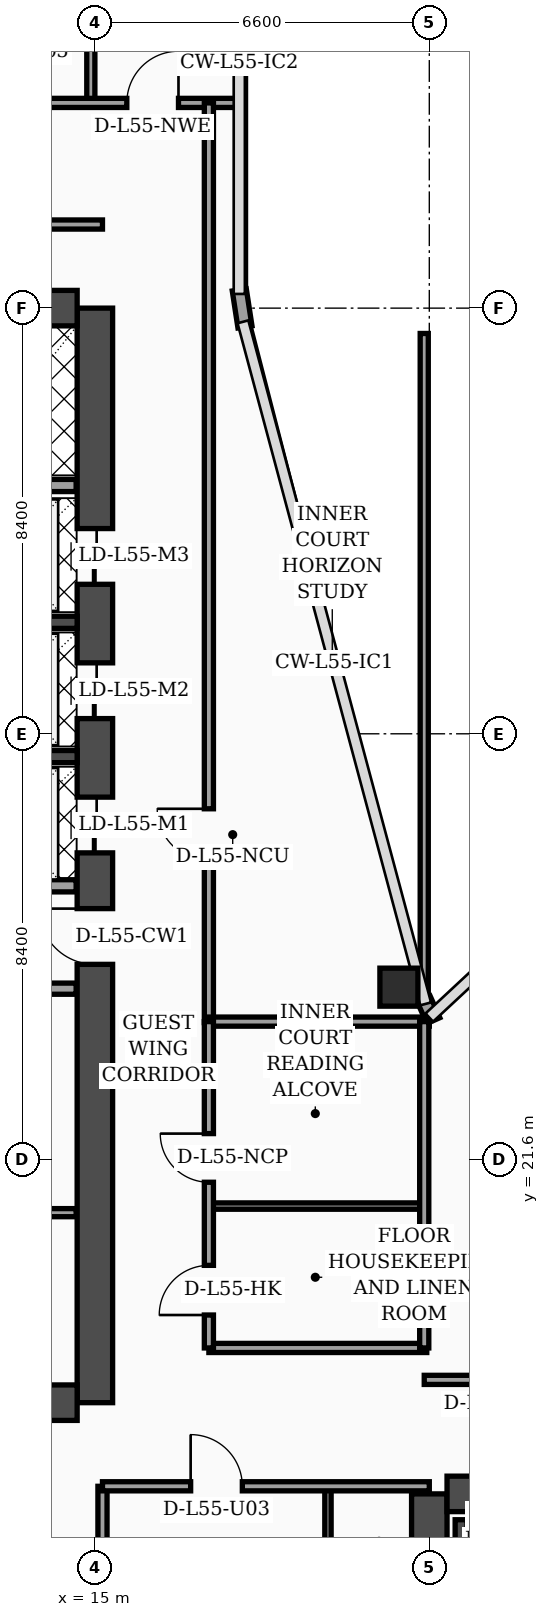
"""IFC4 building model, lengths in metres.
Left out: names, types, materials, properties, quantities, classifications, styles, units other than length and angle.
Written with IfcOpenShell. Run it as: python <this file> out.ifc"""

import sys

from ifc_helpers import new_model, si_unit, direction, frame, frame_2d, origin, origin_2d, place, context, subcontext, project, spatial, rectangle, hollow_rectangle, extrude, element, fill, save


model = new_model("IFC4")
c1 = context("Model", 3, precision=1e-05, world=origin(), true_north=direction((0.0, 1.0)))
c2 = subcontext(c1, "Body", "Model", "MODEL_VIEW")
j1 = project(units=[si_unit("LENGTHUNIT", "METRE"), si_unit("PLANEANGLEUNIT", "RADIAN")], contexts=[c1])
p1 = place(None, origin())
s1 = spatial("IfcSite", under=j1, at=p1, CompositionType="ELEMENT")
p2 = place(p1, origin())
s2 = spatial("IfcBuilding", under=s1, at=p2, CompositionType="ELEMENT")
p3 = place(p2, frame((0.0, 0.0, 223.1)))
s3 = spatial("IfcBuildingStorey", under=s2, at=p3, CompositionType="ELEMENT", Elevation=223.1)
p4 = place(p3, frame((15.0, 16.8, 0.0), z_axis=(0.0, 0.0, 1.0), x_axis=(0.0, 1.0, 0.0)))
e1 = element("IfcWall", 1, at=p4, inside=s3, PredefinedType="SHEAR", context=c2, shape_type="SweptSolid", body=[
    extrude(rectangle(XDim=21.6, YDim=0.7, at=frame_2d((10.8, 0.0))), origin(), (0.0, 0.0, 1.0), 3.56),
])
p5 = place(p4, frame((8.65, 0.0, 0.0)))
e2 = element("IfcOpeningElement", 2, at=p5, cuts=e1, PredefinedType="OPENING", context=c2, shape_type="SweptSolid", body=[
    extrude(rectangle(XDim=1.1, YDim=2.2, at=frame_2d((0.55, 1.1))), frame((0.0, 0.36, 0.0), z_axis=(0.0, -1.0, 0.0), x_axis=(1.0, 0.0, 0.0)), (0.0, 0.0, 1.0), 0.72),
])
p6 = place(p4, frame((10.85, 0.0, 0.0)))
e3 = element("IfcOpeningElement", 3, at=p6, cuts=e1, PredefinedType="OPENING", context=c2, shape_type="SweptSolid", body=[
    extrude(rectangle(XDim=1.1, YDim=2.2, at=frame_2d((0.55, 1.1))), frame((0.0, 0.36, 0.0), z_axis=(0.0, -1.0, 0.0), x_axis=(1.0, 0.0, 0.0)), (0.0, 0.0, 1.0), 0.72),
])
p7 = place(p4, frame((13.5, 0.0, 0.0)))
e4 = element("IfcOpeningElement", 4, at=p7, cuts=e1, PredefinedType="OPENING", context=c2, shape_type="SweptSolid", body=[
    extrude(rectangle(XDim=1.1, YDim=2.2, at=frame_2d((0.55, 1.1))), frame((0.0, 0.36, 0.0), z_axis=(0.0, -1.0, 0.0), x_axis=(1.0, 0.0, 0.0)), (0.0, 0.0, 1.0), 0.72),
])
p8 = place(p4, frame((16.15, 0.0, 0.0)))
e5 = element("IfcOpeningElement", 5, at=p8, cuts=e1, PredefinedType="OPENING", context=c2, shape_type="SweptSolid", body=[
    extrude(rectangle(XDim=1.1, YDim=2.2, at=frame_2d((0.55, 1.1))), frame((0.0, 0.36, 0.0), z_axis=(0.0, -1.0, 0.0), x_axis=(1.0, 0.0, 0.0)), (0.0, 0.0, 1.0), 0.72),
])
for number, where, z_axis, x_axis in (
    (6, (4.55, 38.4, 0.0), (0.0, 0.0, 1.0), (1.0, 0.0, 0.0)),
    (7, (4.55, 16.8, 0.0), (0.0, 0.0, 1.0), (1.0, 0.0, 0.0)),
):
    element("IfcWall", number, at=place(p3, frame(where, z_axis=z_axis, x_axis=x_axis)), inside=s3, PredefinedType="SHEAR", context=c2, shape_type="SweptSolid", body=[
        extrude(rectangle(XDim=10.1, YDim=0.7, at=frame_2d((5.05, 0.0))), origin(), (0.0, 0.0, 1.0), 3.56),
    ])
p9 = place(p3, frame((21.6, 4.6, 0.0), z_axis=(0.0, 0.0, 1.0), x_axis=(0.0, 1.0, 0.0)))
e8 = element("IfcWall", 8, at=p9, inside=s3, PredefinedType="SHEAR", context=c2, shape_type="SweptSolid", body=[
    extrude(rectangle(XDim=10.4, YDim=0.7, at=frame_2d((5.2, 0.0))), origin(), (0.0, 0.0, 1.0), 3.56),
])
p10 = place(p3, frame((21.95, 15.0, 0.0), z_axis=(0.0, 0.0, 1.0), x_axis=(1.0, 0.0, 0.0)))
e9 = element("IfcWall", 9, at=p10, inside=s3, PredefinedType="SHEAR", context=c2, shape_type="SweptSolid", body=[
    extrude(rectangle(XDim=10.1, YDim=0.7, at=frame_2d((5.05, 0.0))), origin(), (0.0, 0.0, 1.0), 3.56),
])
p11 = place(p10, frame((4.95, 0.0, 0.0)))
e10 = element("IfcOpeningElement", 10, at=p11, cuts=e9, PredefinedType="OPENING", context=c2, shape_type="SweptSolid", body=[
    extrude(rectangle(XDim=1.1, YDim=2.2, at=frame_2d((0.55, 1.1))), frame((0.0, 0.36, 0.0), z_axis=(0.0, -1.0, 0.0), x_axis=(1.0, 0.0, 0.0)), (0.0, 0.0, 1.0), 0.72),
])
p12 = place(p3, frame((22.23, 4.95, 0.0), z_axis=(0.0, 0.0, 1.0), x_axis=(0.0, 1.0, 0.0)))
e11 = element("IfcWall", 11, at=p12, inside=s3, PredefinedType="SOLIDWALL", context=c2, shape_type="SweptSolid", body=[
    extrude(rectangle(XDim=9.54, YDim=0.24, at=frame_2d((4.77, 0.0))), origin(), (0.0, 0.0, 1.0), 3.56),
])
p13 = place(p3, frame((22.35, 14.37, 0.0), z_axis=(0.0, 0.0, 1.0), x_axis=(1.0, 0.0, 0.0)))
e12 = element("IfcWall", 12, at=p13, inside=s3, PredefinedType="SOLIDWALL", context=c2, shape_type="SweptSolid", body=[
    extrude(rectangle(XDim=3.1, YDim=0.24, at=frame_2d((1.55, 0.0))), origin(), (0.0, 0.0, 1.0), 3.56),
])
for number, where, z_axis, x_axis in (
    (13, (12.18, 29.55, 0.0), (0.0, 0.0, 1.0), (1.0, 0.0, 0.0)),
    (14, (12.18, 32.2, 0.0), (0.0, 0.0, 1.0), (1.0, 0.0, 0.0)),
):
    element("IfcWall", number, at=place(p3, frame(where, z_axis=z_axis, x_axis=x_axis)), inside=s3, PredefinedType="SOLIDWALL", context=c2, shape_type="SweptSolid", body=[
        extrude(rectangle(XDim=2.47, YDim=0.24, at=frame_2d((1.235, 0.0))), origin(), (0.0, 0.0, 1.0), 3.56),
    ])
p14 = place(p3, frame((21.0, 25.0, 0.0), z_axis=(0.0, 0.0, 1.0), x_axis=(1.0, 0.0, 0.0)))
e15 = element("IfcColumn", 15, at=p14, inside=s3, PredefinedType="COLUMN", context=c2, shape_type="SweptSolid", body=[
    extrude(hollow_rectangle(XDim=0.75, YDim=0.75, WallThickness=0.032, at=origin_2d()), origin(), (0.0, 0.0, 1.0), 3.56),
])
p15 = place(p3, frame((21.68, 24.34, 0.0), z_axis=(0.0, 0.0, 1.0), x_axis=(-0.40758134973, 0.913168901875, 0.0)))
e16 = element("IfcWall", 16, at=p15, inside=s3, PredefinedType="SOLIDWALL", context=c2, shape_type="SweptSolid", body=[
    extrude(rectangle(XDim=0.471, YDim=0.28, at=frame_2d((0.235, 0.0))), origin(), (0.0, 0.0, 1.0), 3.56),
])
p16 = place(p3, frame((17.962, 38.03, 0.0), z_axis=(0.0, 0.0, 1.0), x_axis=(-0.15141125477, 0.988470855377, 0.0)))
e17 = element("IfcWall", 17, at=p16, inside=s3, PredefinedType="SOLIDWALL", context=c2, shape_type="SweptSolid", body=[
    extrude(rectangle(XDim=0.739, YDim=0.28, at=frame_2d((0.369, 0.0))), origin(), (0.0, 0.0, 1.0), 3.56),
])
p17 = place(p3, frame((9.68, 20.55, 0.0), z_axis=(0.0, 0.0, 1.0), x_axis=(1.0, 0.0, 0.0)))
e18 = element("IfcWall", 18, at=p17, inside=s3, PredefinedType="PARTITIONING", context=c2, shape_type="SweptSolid", body=[
    extrude(rectangle(XDim=4.95, YDim=0.16, at=frame_2d((2.475, 0.0))), origin(), (0.0, 0.0, 1.0), 3.56),
])
p18 = place(p17, frame((1.1, 0.0, 0.0)))
e19 = element("IfcOpeningElement", 19, at=p18, cuts=e18, PredefinedType="OPENING", context=c2, shape_type="SweptSolid", body=[
    extrude(rectangle(XDim=0.98, YDim=2.15, at=frame_2d((0.49, 1.075))), frame((0.0, 0.09, 0.0), z_axis=(0.0, -1.0, 0.0), x_axis=(1.0, 0.0, 0.0)), (0.0, 0.0, 1.0), 0.18),
])
p19 = place(p3, frame((9.68, 24.97, 0.0), z_axis=(0.0, 0.0, 1.0), x_axis=(1.0, 0.0, 0.0)))
e20 = element("IfcWall", 20, at=p19, inside=s3, PredefinedType="SOLIDWALL", context=c2, shape_type="SweptSolid", body=[
    extrude(rectangle(XDim=4.95, YDim=0.22, at=frame_2d((2.475, 0.0))), origin(), (0.0, 0.0, 1.0), 2.94),
])
p20 = place(p19, frame((0.9, 0.0, 0.0)))
e21 = element("IfcOpeningElement", 21, at=p20, cuts=e20, PredefinedType="OPENING", context=c2, shape_type="SweptSolid", body=[
    extrude(rectangle(XDim=0.98, YDim=2.15, at=frame_2d((0.49, 1.075))), frame((0.0, 0.12, 0.0), z_axis=(0.0, -1.0, 0.0), x_axis=(1.0, 0.0, 0.0)), (0.0, 0.0, 1.0), 0.24),
])
p21 = place(p3, frame((12.25, 27.0, 0.0), z_axis=(0.0, 0.0, 1.0), x_axis=(1.0, 0.0, 0.0)))
e22 = element("IfcWall", 22, at=p21, inside=s3, PredefinedType="SOLIDWALL", context=c2, shape_type="SweptSolid", body=[
    extrude(rectangle(XDim=2.38, YDim=0.24, at=frame_2d((1.19, 0.0))), origin(), (0.0, 0.0, 1.0), 3.56),
])
p22 = place(p3, frame((9.66, 34.9, 0.0), z_axis=(0.0, 0.0, 1.0), x_axis=(1.0, 0.0, 0.0)))
e23 = element("IfcWall", 23, at=p22, inside=s3, PredefinedType="SOLIDWALL", context=c2, shape_type="SweptSolid", body=[
    extrude(rectangle(XDim=4.97, YDim=0.24, at=frame_2d((2.485, 0.0))), origin(), (0.0, 0.0, 1.0), 3.56),
])
p23 = place(p3, frame((15.15, 2.44, 0.0), z_axis=(0.0, 0.0, 1.0), x_axis=(0.0, 1.0, 0.0)))
e24 = element("IfcWall", 24, at=p23, inside=s3, PredefinedType="PARTITIONING", context=c2, shape_type="SweptSolid", body=[
    extrude(rectangle(XDim=12.71, YDim=0.18, at=frame_2d((6.355, 0.0))), origin(), (0.0, 0.0, 1.0), 3.09),
])
p24 = place(p3, frame((19.6, 2.44, 0.0), z_axis=(0.0, 0.0, 1.0), x_axis=(0.0, 1.0, 0.0)))
e25 = element("IfcWall", 25, at=p24, inside=s3, PredefinedType="PARTITIONING", context=c2, shape_type="SweptSolid", body=[
    extrude(rectangle(XDim=12.71, YDim=0.125, at=frame_2d((6.355, 0.0))), origin(), (0.0, 0.0, 1.0), 2.59),
])
p25 = place(p24, frame((4.34, 0.0, 0.0)))
e26 = element("IfcOpeningElement", 26, at=p25, cuts=e25, PredefinedType="OPENING", context=c2, shape_type="SweptSolid", body=[
    extrude(rectangle(XDim=0.96, YDim=2.2, at=frame_2d((0.48, 1.1))), frame((0.0, 0.073, 0.0), z_axis=(0.0, -1.0, 0.0), x_axis=(1.0, 0.0, 0.0)), (0.0, 0.0, 1.0), 0.145),
])
p26 = place(p24, frame((10.18, 0.0, 0.0)))
e27 = element("IfcOpeningElement", 27, at=p26, cuts=e25, PredefinedType="OPENING", context=c2, shape_type="SweptSolid", body=[
    extrude(rectangle(XDim=0.9, YDim=2.15, at=frame_2d((0.45, 1.075))), frame((0.0, 0.073, 0.0), z_axis=(0.0, -1.0, 0.0), x_axis=(1.0, 0.0, 0.0)), (0.0, 0.0, 1.0), 0.145),
])
p27 = place(p3, frame((15.15, 15.15, 0.0), z_axis=(0.0, 0.0, 1.0), x_axis=(1.0, 0.0, 0.0)))
e28 = element("IfcWall", 28, at=p27, inside=s3, PredefinedType="PARTITIONING", context=c2, shape_type="SweptSolid", body=[
    extrude(rectangle(XDim=6.45, YDim=0.18, at=frame_2d((3.225, 0.0))), origin(), (0.0, 0.0, 1.0), 2.59),
])
p28 = place(p27, frame((1.74, 0.0, 0.0)))
e29 = element("IfcOpeningElement", 29, at=p28, cuts=e28, PredefinedType="OPENING", context=c2, shape_type="SweptSolid", body=[
    extrude(rectangle(XDim=1.02, YDim=2.2, at=frame_2d((0.51, 1.1))), frame((0.0, 0.1, 0.0), z_axis=(0.0, -1.0, 0.0), x_axis=(1.0, 0.0, 0.0)), (0.0, 0.0, 1.0), 0.2),
])
p29 = place(p3, frame((14.92, 42.45, 0.0), z_axis=(0.0, 0.0, 1.0), x_axis=(0.0, 1.0, 0.0)))
e30 = element("IfcWall", 30, at=p29, inside=s3, PredefinedType="PARTITIONING", context=c2, shape_type="SweptSolid", body=[
    extrude(rectangle(XDim=5.35, YDim=0.16, at=frame_2d((2.675, 0.0))), origin(), (0.0, 0.0, 1.0), 3.09),
])
p30 = place(p3, frame((0.08, 42.45, 0.0), z_axis=(0.0, 0.0, 1.0), x_axis=(1.0, 0.0, 0.0)))
e31 = element("IfcWall", 31, at=p30, inside=s3, PredefinedType="PARTITIONING", context=c2, shape_type="SweptSolid", body=[
    extrude(rectangle(XDim=17.77, YDim=0.18, at=frame_2d((8.885, 0.0))), origin(), (0.0, 0.0, 1.0), 2.94),
])
p31 = place(p30, frame((0.9, 0.0, 0.0)))
e32 = element("IfcOpeningElement", 32, at=p31, cuts=e31, PredefinedType="OPENING", context=c2, shape_type="SweptSolid", body=[
    extrude(rectangle(XDim=1.02, YDim=2.2, at=frame_2d((0.51, 1.1))), frame((0.0, 0.1, 0.0), z_axis=(0.0, -1.0, 0.0), x_axis=(1.0, 0.0, 0.0)), (0.0, 0.0, 1.0), 0.2),
])
p32 = place(p30, frame((4.75, 0.0, 0.0)))
e33 = element("IfcOpeningElement", 33, at=p32, cuts=e31, PredefinedType="OPENING", context=c2, shape_type="SweptSolid", body=[
    extrude(rectangle(XDim=1.02, YDim=2.2, at=frame_2d((0.51, 1.1))), frame((0.0, 0.1, 0.0), z_axis=(0.0, -1.0, 0.0), x_axis=(1.0, 0.0, 0.0)), (0.0, 0.0, 1.0), 0.2),
])
p33 = place(p30, frame((10.63, 0.0, 0.0)))
e34 = element("IfcOpeningElement", 34, at=p33, cuts=e31, PredefinedType="OPENING", context=c2, shape_type="SweptSolid", body=[
    extrude(rectangle(XDim=1.02, YDim=2.2, at=frame_2d((0.51, 1.1))), frame((0.0, 0.1, 0.0), z_axis=(0.0, -1.0, 0.0), x_axis=(1.0, 0.0, 0.0)), (0.0, 0.0, 1.0), 0.2),
])
p34 = place(p30, frame((15.55, 0.0, 0.0)))
e35 = element("IfcOpeningElement", 35, at=p34, cuts=e31, PredefinedType="OPENING", context=c2, shape_type="SweptSolid", body=[
    extrude(rectangle(XDim=1.02, YDim=2.2, at=frame_2d((0.51, 1.1))), frame((0.0, 0.1, 0.0), z_axis=(0.0, -1.0, 0.0), x_axis=(1.0, 0.0, 0.0)), (0.0, 0.0, 1.0), 0.2),
])
p35 = place(p3, frame((17.25, 24.3, 0.0), z_axis=(0.0, 0.0, 1.0), x_axis=(0.0, 1.0, 0.0)))
e36 = element("IfcWall", 36, at=p35, inside=s3, PredefinedType="PARTITIONING", context=c2, shape_type="SweptSolid", body=[
    extrude(rectangle(XDim=18.15, YDim=0.18, at=frame_2d((9.075, 0.0))), origin(), (0.0, 0.0, 1.0), 2.94),
])
p36 = place(p35, frame((3.2, 0.0, 0.0)))
e37 = element("IfcOpeningElement", 37, at=p36, cuts=e36, PredefinedType="OPENING", context=c2, shape_type="SweptSolid", body=[
    extrude(rectangle(XDim=1.02, YDim=2.2, at=frame_2d((0.51, 1.1))), frame((0.0, 0.1, 0.0), z_axis=(0.0, -1.0, 0.0), x_axis=(1.0, 0.0, 0.0)), (0.0, 0.0, 1.0), 0.2),
])
p37 = place(p3, frame((3.83, 40.05, 0.0), z_axis=(0.0, 0.0, 1.0), x_axis=(1.0, 0.0, 0.0)))
e38 = element("IfcWall", 38, at=p37, inside=s3, PredefinedType="PARTITIONING", context=c2, shape_type="SweptSolid", body=[
    extrude(rectangle(XDim=11.32, YDim=0.18, at=frame_2d((5.66, 0.0))), origin(), (0.0, 0.0, 1.0), 2.94),
])
p38 = place(p3, frame((17.25, 17.88, 0.0), z_axis=(0.0, 0.0, 1.0), x_axis=(1.0, 0.0, 0.0)))
e39 = element("IfcWall", 39, at=p38, inside=s3, PredefinedType="PARTITIONING", context=c2, shape_type="SweptSolid", body=[
    extrude(rectangle(XDim=4.3, YDim=0.18, at=frame_2d((2.15, 0.0))), origin(), (0.0, 0.0, 1.0), 3.09),
])
p39 = place(p3, frame((17.25, 20.68, 0.0), z_axis=(0.0, 0.0, 1.0), x_axis=(1.0, 0.0, 0.0)))
e40 = element("IfcWall", 40, at=p39, inside=s3, PredefinedType="PARTITIONING", context=c2, shape_type="SweptSolid", body=[
    extrude(rectangle(XDim=4.3, YDim=0.125, at=frame_2d((2.15, 0.0))), origin(), (0.0, 0.0, 1.0), 3.56),
])
p40 = place(p3, frame((17.25, 24.32, 0.0), z_axis=(0.0, 0.0, 1.0), x_axis=(1.0, 0.0, 0.0)))
e41 = element("IfcWall", 41, at=p40, inside=s3, PredefinedType="PARTITIONING", context=c2, shape_type="SweptSolid", body=[
    extrude(rectangle(XDim=4.35, YDim=0.18, at=frame_2d((2.175, 0.0))), origin(), (0.0, 0.0, 1.0), 3.56),
])
p41 = place(p3, frame((21.5, 17.88, 0.0), z_axis=(0.0, 0.0, 1.0), x_axis=(0.0, 1.0, 0.0)))
e42 = element("IfcWall", 42, at=p41, inside=s3, PredefinedType="PARTITIONING", context=c2, shape_type="SweptSolid", body=[
    extrude(rectangle(XDim=6.44, YDim=0.18, at=frame_2d((3.22, 0.0))), origin(), (0.0, 0.0, 1.0), 3.09),
])
p42 = place(p3, frame((17.25, 17.88, 0.0), z_axis=(0.0, 0.0, 1.0), x_axis=(0.0, 1.0, 0.0)))
e43 = element("IfcWall", 43, at=p42, inside=s3, PredefinedType="PARTITIONING", context=c2, shape_type="SweptSolid", body=[
    extrude(rectangle(XDim=6.44, YDim=0.18, at=frame_2d((3.22, 0.0))), origin(), (0.0, 0.0, 1.0), 3.09),
])
p43 = place(p42, frame((0.65, 0.0, 0.0)))
e44 = element("IfcOpeningElement", 44, at=p43, cuts=e43, PredefinedType="OPENING", context=c2, shape_type="SweptSolid", body=[
    extrude(rectangle(XDim=0.98, YDim=2.15, at=frame_2d((0.49, 1.075))), frame((0.0, 0.1, 0.0), z_axis=(0.0, -1.0, 0.0), x_axis=(1.0, 0.0, 0.0)), (0.0, 0.0, 1.0), 0.2),
])
p44 = place(p42, frame((3.27, 0.0, 0.0)))
e45 = element("IfcOpeningElement", 45, at=p44, cuts=e43, PredefinedType="OPENING", context=c2, shape_type="SweptSolid", body=[
    extrude(rectangle(XDim=0.96, YDim=2.2, at=frame_2d((0.48, 1.1))), frame((0.0, 0.1, 0.0), z_axis=(0.0, -1.0, 0.0), x_axis=(1.0, 0.0, 0.0)), (0.0, 0.0, 1.0), 0.2),
])
p45 = place(p3, frame((21.5, 24.85, 0.0), z_axis=(0.0, 0.0, 1.0), x_axis=(0.0, 1.0, 0.0)))
e46 = element("IfcWall", 46, at=p45, inside=s3, PredefinedType="PARTITIONING", context=c2, shape_type="SweptSolid", body=[
    extrude(rectangle(XDim=13.05, YDim=0.16, at=frame_2d((6.525, 0.0))), origin(), (0.0, 0.0, 1.0), 2.94),
])
p46 = place(p3, frame((21.5, 17.25, 0.0), z_axis=(0.0, 0.0, 1.0), x_axis=(1.0, 0.0, 0.0)))
e47 = element("IfcWall", 47, at=p46, inside=s3, PredefinedType="PARTITIONING", context=c2, shape_type="SweptSolid", body=[
    extrude(rectangle(XDim=6.9, YDim=0.18, at=frame_2d((3.45, 0.0))), origin(), (0.0, 0.0, 1.0), 2.94),
])
p47 = place(p46, frame((0.95, 0.0, 0.0)))
e48 = element("IfcOpeningElement", 48, at=p47, cuts=e47, PredefinedType="OPENING", context=c2, shape_type="SweptSolid", body=[
    extrude(rectangle(XDim=1.02, YDim=2.2, at=frame_2d((0.51, 1.1))), frame((0.0, 0.1, 0.0), z_axis=(0.0, -1.0, 0.0), x_axis=(1.0, 0.0, 0.0)), (0.0, 0.0, 1.0), 0.2),
])
p48 = place(p28, origin())
e49 = element("IfcDoor", 49, at=p48, inside=s3, OperationType="SINGLE_SWING_LEFT", PredefinedType="DOOR", context=c2, shape_type="SweptSolid", body=[
    extrude(rectangle(XDim=1.02, YDim=2.2, at=frame_2d((0.51, 1.1))), frame((0.0, 0.025, 0.0), z_axis=(0.0, -1.0, 0.0), x_axis=(1.0, 0.0, 0.0)), (0.0, 0.0, 1.0), 0.05),
])
fill(e29, e49)
p49 = place(p34, origin())
e50 = element("IfcDoor", 50, at=p49, inside=s3, OperationType="SINGLE_SWING_RIGHT", PredefinedType="DOOR", context=c2, shape_type="SweptSolid", body=[
    extrude(rectangle(XDim=1.02, YDim=2.2, at=frame_2d((0.51, 1.1))), frame((0.0, 0.025, 0.0), z_axis=(0.0, -1.0, 0.0), x_axis=(1.0, 0.0, 0.0)), (0.0, 0.0, 1.0), 0.05),
])
fill(e35, e50)
p50 = place(p36, origin())
e51 = element("IfcDoor", 51, at=p50, inside=s3, OperationType="SINGLE_SWING_RIGHT", PredefinedType="DOOR", context=c2, shape_type="SweptSolid", body=[
    extrude(rectangle(XDim=1.02, YDim=2.2, at=frame_2d((0.51, 1.1))), frame((0.0, 0.025, 0.0), z_axis=(0.0, -1.0, 0.0), x_axis=(1.0, 0.0, 0.0)), (0.0, 0.0, 1.0), 0.05),
])
fill(e37, e51)
p51 = place(p43, origin())
e52 = element("IfcDoor", 52, at=p51, inside=s3, OperationType="SINGLE_SWING_LEFT", PredefinedType="DOOR", context=c2, shape_type="SweptSolid", body=[
    extrude(rectangle(XDim=0.98, YDim=2.15, at=frame_2d((0.49, 1.075))), frame((0.0, 0.025, 0.0), z_axis=(0.0, -1.0, 0.0), x_axis=(1.0, 0.0, 0.0)), (0.0, 0.0, 1.0), 0.05),
])
fill(e44, e52)
p52 = place(p44, origin())
e53 = element("IfcDoor", 53, at=p52, inside=s3, OperationType="SINGLE_SWING_RIGHT", PredefinedType="DOOR", context=c2, shape_type="SweptSolid", body=[
    extrude(rectangle(XDim=0.96, YDim=2.2, at=frame_2d((0.48, 1.1))), frame((0.0, 0.025, 0.0), z_axis=(0.0, -1.0, 0.0), x_axis=(1.0, 0.0, 0.0)), (0.0, 0.0, 1.0), 0.05),
])
fill(e45, e53)
p53 = place(p5, origin())
e54 = element("IfcDoor", 54, at=p53, inside=s3, OperationType="SINGLE_SWING_RIGHT", PredefinedType="DOOR", context=c2, shape_type="SweptSolid", body=[
    extrude(rectangle(XDim=1.1, YDim=2.2, at=frame_2d((0.55, 1.1))), frame((0.0, 0.025, 0.0), z_axis=(0.0, -1.0, 0.0), x_axis=(1.0, 0.0, 0.0)), (0.0, 0.0, 1.0), 0.05),
])
fill(e2, e54)
p54 = place(p6, origin())
e55 = element("IfcDoor", 55, at=p54, inside=s3, OperationType="DOUBLE_DOOR_SLIDING", PredefinedType="DOOR", context=c2, shape_type="SweptSolid", body=[
    extrude(rectangle(XDim=1.1, YDim=2.2, at=frame_2d((0.55, 1.1))), frame((0.0, 0.025, 0.0), z_axis=(0.0, -1.0, 0.0), x_axis=(1.0, 0.0, 0.0)), (0.0, 0.0, 1.0), 0.05),
])
fill(e3, e55)
p55 = place(p7, origin())
e56 = element("IfcDoor", 56, at=p55, inside=s3, OperationType="DOUBLE_DOOR_SLIDING", PredefinedType="DOOR", context=c2, shape_type="SweptSolid", body=[
    extrude(rectangle(XDim=1.1, YDim=2.2, at=frame_2d((0.55, 1.1))), frame((0.0, 0.025, 0.0), z_axis=(0.0, -1.0, 0.0), x_axis=(1.0, 0.0, 0.0)), (0.0, 0.0, 1.0), 0.05),
])
fill(e4, e56)
p56 = place(p8, origin())
e57 = element("IfcDoor", 57, at=p56, inside=s3, OperationType="DOUBLE_DOOR_SLIDING", PredefinedType="DOOR", context=c2, shape_type="SweptSolid", body=[
    extrude(rectangle(XDim=1.1, YDim=2.2, at=frame_2d((0.55, 1.1))), frame((0.0, 0.025, 0.0), z_axis=(0.0, -1.0, 0.0), x_axis=(1.0, 0.0, 0.0)), (0.0, 0.0, 1.0), 0.05),
])
fill(e5, e57)
save(model, sys.argv[1])
